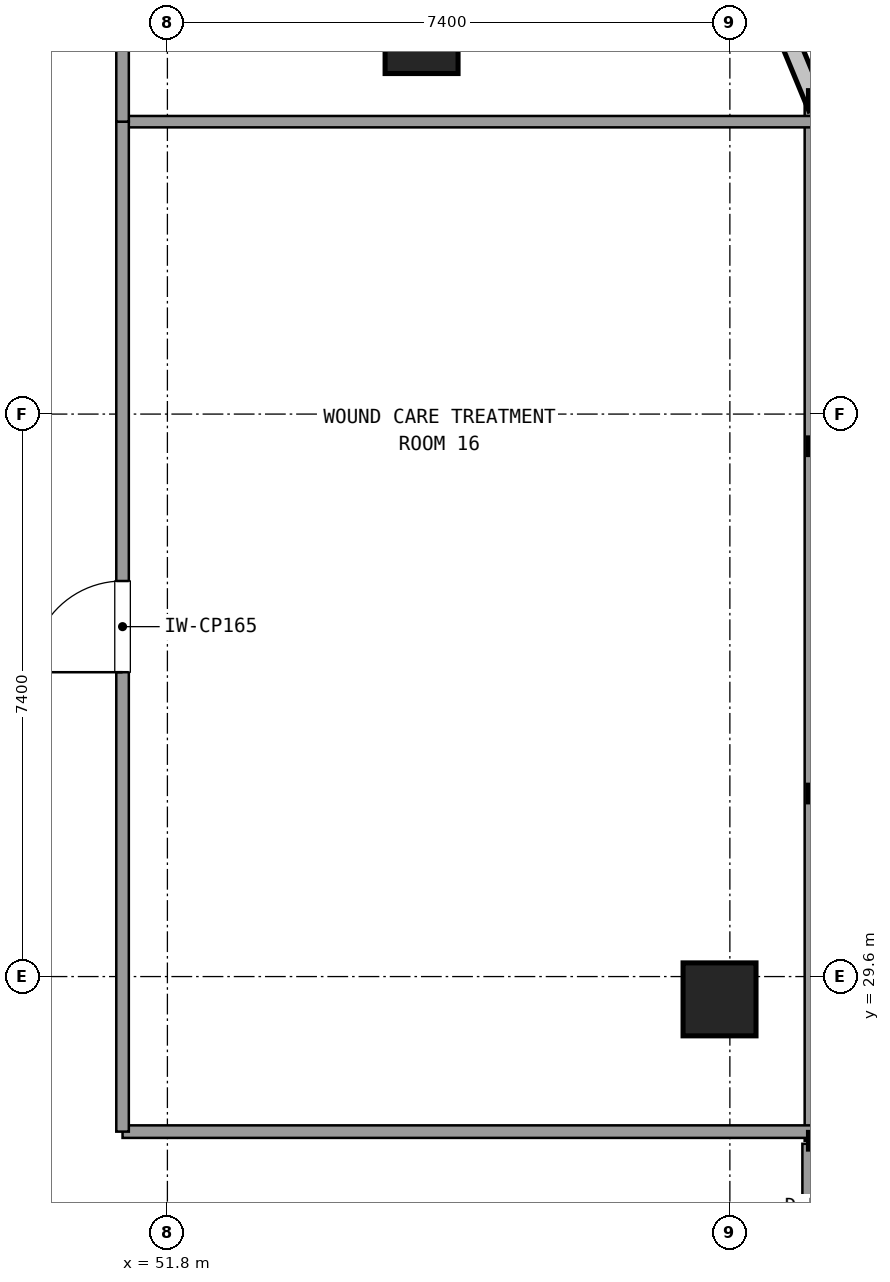
"""IFC4 building model, lengths in metres.
Left out: names, types, materials, properties, quantities, classifications, styles, units other than length and angle.
Written with IfcOpenShell. Run it as: python <this file> out.ifc"""

import sys

from ifc_helpers import new_model, si_unit, direction, frame, frame_2d, origin, origin_2d, place, context, subcontext, project, spatial, rectangle, extrude, element, fill, save


model = new_model("IFC4")
c1 = context("Model", 3, precision=1e-05, world=origin(), true_north=direction((0.0, 1.0)))
c2 = subcontext(c1, "Body", "Model", "MODEL_VIEW")
j1 = project(units=[si_unit("LENGTHUNIT", "METRE"), si_unit("PLANEANGLEUNIT", "RADIAN")], contexts=[c1])
p1 = place(None, origin())
s1 = spatial("IfcSite", under=j1, at=p1, CompositionType="ELEMENT")
p2 = place(p1, origin())
s2 = spatial("IfcBuilding", under=s1, at=p2, CompositionType="ELEMENT")
p3 = place(p2, frame((0.0, 0.0, 142.02)))
s3 = spatial("IfcBuildingStorey", under=s2, at=p3, CompositionType="ELEMENT", Elevation=142.02)
for number, where, z_axis, x_axis in (
    (1, (59.064, 29.3, 0.0), (0.0, 0.0, 1.0), (1.0, 0.0, 0.0)),
    (2, (55.144, 41.96, 0.0), (0.0, 0.0, 1.0), (1.0, 0.0, 0.0)),
):
    element("IfcColumn", number, at=place(p3, frame(where, z_axis=z_axis, x_axis=x_axis)), inside=s3, PredefinedType="COLUMN", context=c2, shape_type="SweptSolid", body=[
        extrude(rectangle(XDim=0.96, YDim=0.96, at=origin_2d()), origin(), (0.0, 0.0, 1.0), 3.6),
    ])
p4 = place(p3, frame((60.304, 24.4, 0.0), z_axis=(0.0, 0.0, 1.0), x_axis=(0.0, 1.0, 0.0)))
e3 = element("IfcWall", 3, at=p4, inside=s3, PredefinedType="SOLIDWALL", context=c2, shape_type="SweptSolid", body=[
    extrude(rectangle(XDim=3.0, YDim=0.3, at=frame_2d((1.5, 0.0))), origin(), (0.0, 0.0, 1.0), 2.67),
])
p5 = place(p4, frame((0.9, 0.0, 0.0)))
e4 = element("IfcOpeningElement", 4, at=p5, cuts=e3, PredefinedType="OPENING", context=c2, shape_type="SweptSolid", body=[
    extrude(rectangle(XDim=1.2, YDim=2.2, at=frame_2d((0.6, 1.1))), frame((0.0, 0.16, 0.0), z_axis=(0.0, -1.0, 0.0), x_axis=(1.0, 0.0, 0.0)), (0.0, 0.0, 1.0), 0.32),
])
p6 = place(p3, frame((60.304, 27.44, 0.0), z_axis=(0.0, 0.0, 1.0), x_axis=(0.0, 1.0, 0.0)))
e5 = element("IfcWall", 5, at=p6, inside=s3, PredefinedType="SOLIDWALL", context=c2, shape_type="SweptSolid", body=[
    extrude(rectangle(XDim=13.705, YDim=0.24, at=frame_2d((6.853, 0.0))), origin(), (0.0, 0.0, 1.0), 0.85),
])
p7 = place(p3, frame((51.21, 27.56, 0.0), z_axis=(0.0, 0.0, 1.0), x_axis=(1.0, 0.0, 0.0)))
e6 = element("IfcWall", 6, at=p7, inside=s3, PredefinedType="PARTITIONING", context=c2, shape_type="SweptSolid", body=[
    extrude(rectangle(XDim=9.074, YDim=0.165, at=frame_2d((4.537, 0.0))), origin(), (0.0, 0.0, 1.0), 2.61),
])
p8 = place(p3, frame((51.21, 40.847, 0.0), z_axis=(0.0, 0.0, 1.0), x_axis=(1.0, 0.0, 0.0)))
e7 = element("IfcWall", 7, at=p8, inside=s3, PredefinedType="PARTITIONING", context=c2, shape_type="SweptSolid", body=[
    extrude(rectangle(XDim=9.074, YDim=0.15, at=frame_2d((4.537, 0.0))), origin(), (0.0, 0.0, 1.0), 2.61),
])
p9 = place(p3, frame((51.21, 27.56, 0.0), z_axis=(0.0, 0.0, 1.0), x_axis=(0.0, 1.0, 0.0)))
e8 = element("IfcWall", 8, at=p9, inside=s3, PredefinedType="PARTITIONING", context=c2, shape_type="SweptSolid", body=[
    extrude(rectangle(XDim=13.287, YDim=0.165, at=frame_2d((6.644, 0.0))), origin(), (0.0, 0.0, 1.0), 2.61),
])
p10 = place(p9, frame((6.044, 0.0, 0.0)))
e9 = element("IfcOpeningElement", 9, at=p10, cuts=e8, PredefinedType="OPENING", context=c2, shape_type="SweptSolid", body=[
    extrude(rectangle(XDim=1.2, YDim=2.15, at=frame_2d((0.6, 1.075))), frame((0.0, 0.093, 0.0), z_axis=(0.0, -1.0, 0.0), x_axis=(1.0, 0.0, 0.0)), (0.0, 0.0, 1.0), 0.185),
])
p11 = place(p3, frame((51.21, 40.847, 0.0), z_axis=(0.0, 0.0, 1.0), x_axis=(0.0, 1.0, 0.0)))
e10 = element("IfcWall", 10, at=p11, inside=s3, PredefinedType="PARTITIONING", context=c2, shape_type="SweptSolid", body=[
    extrude(rectangle(XDim=6.253, YDim=0.165, at=frame_2d((3.126, 0.0))), origin(), (0.0, 0.0, 1.0), 2.61),
])
p12 = place(p11, frame((2.526, 0.0, 0.0)))
e11 = element("IfcOpeningElement", 11, at=p12, cuts=e10, PredefinedType="OPENING", context=c2, shape_type="SweptSolid", body=[
    extrude(rectangle(XDim=1.2, YDim=2.15, at=frame_2d((0.6, 1.075))), frame((0.0, 0.093, 0.0), z_axis=(0.0, -1.0, 0.0), x_axis=(1.0, 0.0, 0.0)), (0.0, 0.0, 1.0), 0.185),
])
p13 = place(p10, origin())
e12 = element("IfcDoor", 12, at=p13, inside=s3, OperationType="SINGLE_SWING_LEFT", PredefinedType="DOOR", context=c2, shape_type="SweptSolid", body=[
    extrude(rectangle(XDim=1.2, YDim=2.15, at=frame_2d((0.6, 1.075))), frame((0.0, 0.025, 0.0), z_axis=(0.0, -1.0, 0.0), x_axis=(1.0, 0.0, 0.0)), (0.0, 0.0, 1.0), 0.05),
])
fill(e9, e12)
save(model, sys.argv[1])
